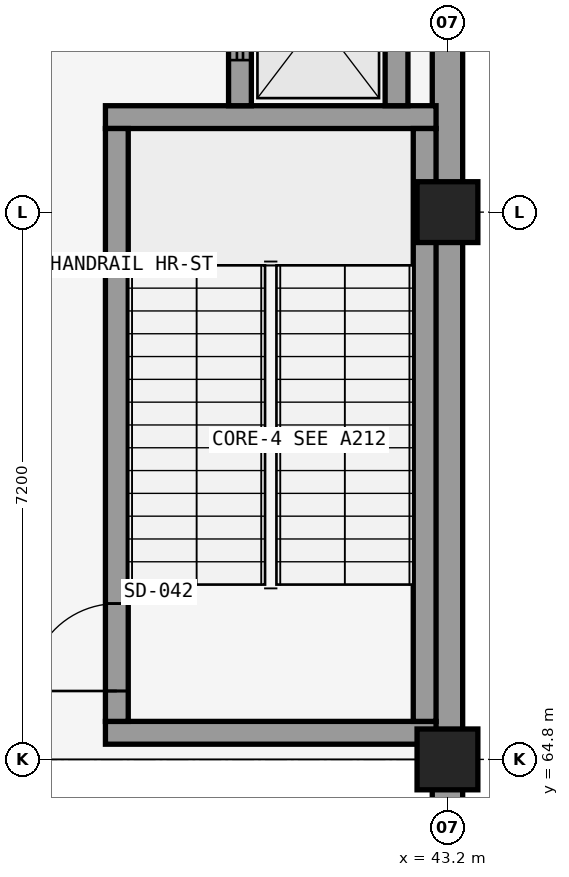
"""IFC4 building model, lengths in metres.
Left out: names, types, materials, properties, quantities, classifications, styles, units other than length and angle.
Written with IfcOpenShell. Run it as: python <this file> out.ifc"""

import sys

from ifc_helpers import new_model, si_unit, direction, frame, frame_2d, origin, origin_2d, place, context, subcontext, project, spatial, rectangle, extrude, element, fill, save


model = new_model("IFC4")
c1 = context("Model", 3, precision=1e-05, world=origin(), true_north=direction((0.0, 1.0)))
c2 = subcontext(c1, "Body", "Model", "MODEL_VIEW")
j1 = project(units=[si_unit("LENGTHUNIT", "METRE"), si_unit("PLANEANGLEUNIT", "RADIAN")], contexts=[c1])
p1 = place(None, origin())
s1 = spatial("IfcSite", under=j1, at=p1, CompositionType="ELEMENT")
p2 = place(p1, origin())
s2 = spatial("IfcBuilding", under=s1, at=p2, CompositionType="ELEMENT")
p3 = place(p2, frame((0.0, 0.0, -4.8)))
s3 = spatial("IfcBuildingStorey", under=s2, at=p3, CompositionType="ELEMENT", Elevation=-4.8)
for number, where, z_axis, x_axis in (
    (1, (43.2, 64.8, 0.0), (0.0, 0.0, 1.0), (1.0, 0.0, 0.0)),
    (2, (43.2, 72.0, 0.0), (0.0, 0.0, 1.0), (1.0, 0.0, 0.0)),
):
    element("IfcColumn", number, at=place(p3, frame(where, z_axis=z_axis, x_axis=x_axis)), inside=s3, PredefinedType="COLUMN", context=c2, shape_type="SweptSolid", body=[
        extrude(rectangle(XDim=0.8, YDim=0.8, at=origin_2d()), origin(), (0.0, 0.0, 1.0), 4.8),
    ])
p4 = place(p3, frame((43.2, 57.6, 0.0), z_axis=(0.0, 0.0, 1.0), x_axis=(0.0, 1.0, 0.0)))
e3 = element("IfcWall", 3, at=p4, inside=s3, PredefinedType="STANDARD", context=c2, shape_type="SweptSolid", body=[
    extrude(rectangle(XDim=36.0, YDim=0.4, at=frame_2d((18.0, 0.0))), origin(), (0.0, 0.0, 1.0), 4.4),
])
for number, where, z_axis, x_axis in (
    (4, (38.7, 65.15, 0.0), (0.0, 0.0, 1.0), (1.0, 0.0, 0.0)),
    (5, (38.7, 73.25, 0.0), (0.0, 0.0, 1.0), (1.0, 0.0, 0.0)),
):
    element("IfcWall", number, at=place(p3, frame(where, z_axis=z_axis, x_axis=x_axis)), inside=s3, PredefinedType="SHEAR", context=c2, shape_type="SweptSolid", body=[
        extrude(rectangle(XDim=4.35, YDim=0.3, at=frame_2d((2.175, 0.0))), origin(), (0.0, 0.0, 1.0), 4.4),
    ])
p5 = place(p3, frame((38.85, 65.3, 0.0), z_axis=(0.0, 0.0, 1.0), x_axis=(0.0, 1.0, 0.0)))
e6 = element("IfcWall", 6, at=p5, inside=s3, PredefinedType="SHEAR", context=c2, shape_type="SweptSolid", body=[
    extrude(rectangle(XDim=7.8, YDim=0.3, at=frame_2d((3.9, 0.0))), origin(), (0.0, 0.0, 1.0), 4.4),
])
p6 = place(p5, frame((0.4, 0.0, 0.0)))
e7 = element("IfcOpeningElement", 7, at=p6, cuts=e6, PredefinedType="OPENING", context=c2, shape_type="SweptSolid", body=[
    extrude(rectangle(XDim=1.15, YDim=2.2, at=frame_2d((0.575, 1.1))), frame((0.0, 0.16, 0.0), z_axis=(0.0, -1.0, 0.0), x_axis=(1.0, 0.0, 0.0)), (0.0, 0.0, 1.0), 0.32),
])
p7 = place(p3, frame((42.9, 65.3, 0.0), z_axis=(0.0, 0.0, 1.0), x_axis=(0.0, 1.0, 0.0)))
e8 = element("IfcWall", 8, at=p7, inside=s3, PredefinedType="SHEAR", context=c2, shape_type="SweptSolid", body=[
    extrude(rectangle(XDim=7.8, YDim=0.3, at=frame_2d((3.9, 0.0))), origin(), (0.0, 0.0, 1.0), 4.4),
])
p8 = place(p3, frame((40.47, 73.4, 0.0), z_axis=(0.0, 0.0, 1.0), x_axis=(0.0, 1.0, 0.0)))
e9 = element("IfcWall", 9, at=p8, inside=s3, PredefinedType="SHEAR", context=c2, shape_type="SweptSolid", body=[
    extrude(rectangle(XDim=2.28, YDim=0.3, at=frame_2d((1.14, 0.0))), origin(), (0.0, 0.0, 1.0), 4.4),
])
p9 = place(p8, frame((0.6, 0.0, 0.0)))
e10 = element("IfcOpeningElement", 10, at=p9, cuts=e9, PredefinedType="OPENING", context=c2, shape_type="SweptSolid", body=[
    extrude(rectangle(XDim=1.1, YDim=2.2, at=frame_2d((0.55, 1.1))), frame((0.0, 0.16, 0.0), z_axis=(0.0, -1.0, 0.0), x_axis=(1.0, 0.0, 0.0)), (0.0, 0.0, 1.0), 0.32),
])
p10 = place(p3, frame((42.53, 73.4, 0.0), z_axis=(0.0, 0.0, 1.0), x_axis=(0.0, 1.0, 0.0)))
e11 = element("IfcWall", 11, at=p10, inside=s3, PredefinedType="SHEAR", context=c2, shape_type="SweptSolid", body=[
    extrude(rectangle(XDim=2.28, YDim=0.3, at=frame_2d((1.14, 0.0))), origin(), (0.0, 0.0, 1.0), 4.4),
])
p11 = place(p6, frame((1.15, 0.0, 0.0), z_axis=(0.0, 0.0, 1.0), x_axis=(-1.0, 0.0, 0.0)))
e12 = element("IfcDoor", 12, at=p11, inside=s3, OperationType="SINGLE_SWING_LEFT", PredefinedType="DOOR", context=c2, shape_type="SweptSolid", body=[
    extrude(rectangle(XDim=1.15, YDim=2.2, at=frame_2d((0.575, 1.1))), frame((0.0, 0.025, 0.0), z_axis=(0.0, -1.0, 0.0), x_axis=(1.0, 0.0, 0.0)), (0.0, 0.0, 1.0), 0.05),
])
fill(e7, e12)
p12 = place(p9, origin())
e13 = element("IfcDoor", 13, at=p12, inside=s3, OperationType="SLIDING_TO_LEFT", PredefinedType="DOOR", context=c2, shape_type="SweptSolid", body=[
    extrude(rectangle(XDim=1.1, YDim=2.2, at=frame_2d((0.55, 1.1))), frame((0.0, 0.025, 0.0), z_axis=(0.0, -1.0, 0.0), x_axis=(1.0, 0.0, 0.0)), (0.0, 0.0, 1.0), 0.05),
])
fill(e10, e13)
save(model, sys.argv[1])
